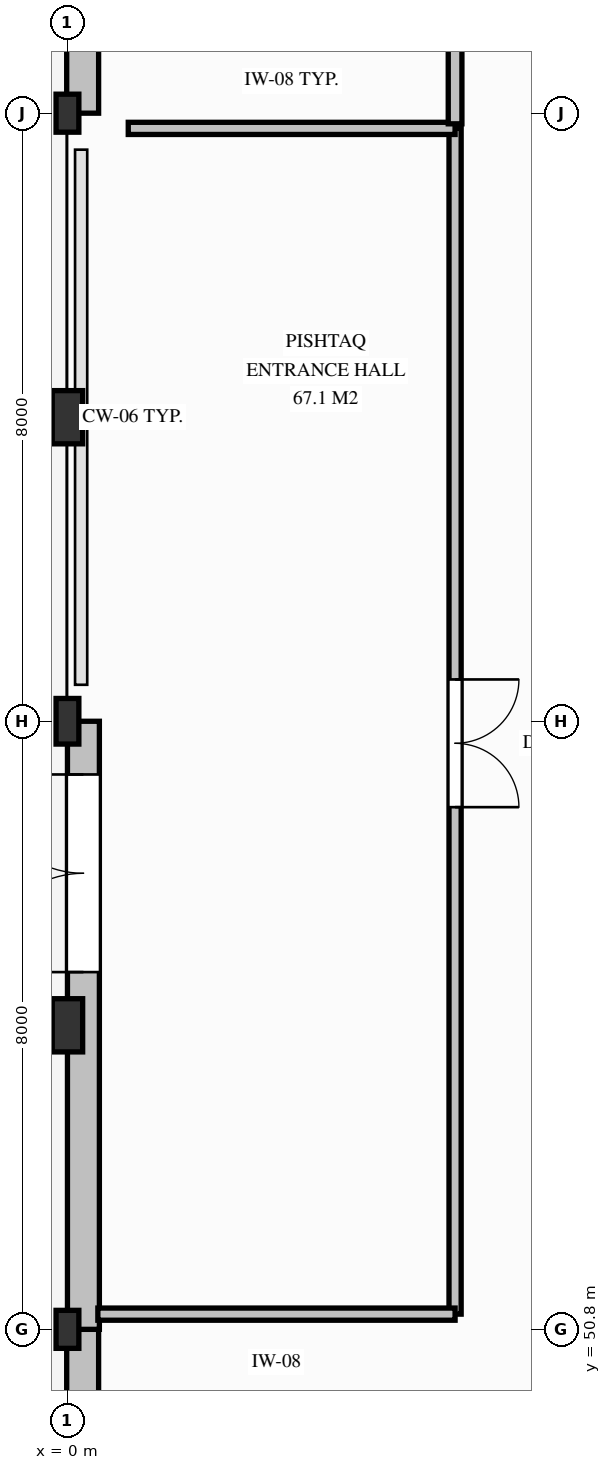
"""IFC4 building model, lengths in metres.
Left out: names, types, materials, properties, quantities, classifications, styles, units other than length and angle.
Written with IfcOpenShell. Run it as: python <this file> out.ifc"""

import sys

from ifc_helpers import new_model, si_unit, direction, frame, frame_2d, origin, origin_2d, place, context, subcontext, project, spatial, rectangle, i_section, extrude, element, fill, save


model = new_model("IFC4")
c1 = context("Model", 3, precision=1e-05, world=origin(), true_north=direction((0.0, 1.0)))
c2 = subcontext(c1, "Body", "Model", "MODEL_VIEW")
j1 = project(units=[si_unit("LENGTHUNIT", "METRE"), si_unit("PLANEANGLEUNIT", "RADIAN")], contexts=[c1])
p1 = place(None, origin())
s1 = spatial("IfcSite", under=j1, at=p1, CompositionType="ELEMENT")
p2 = place(p1, origin())
s2 = spatial("IfcBuilding", under=s1, at=p2, CompositionType="ELEMENT")
p3 = place(p2, origin())
s3 = spatial("IfcBuildingStorey", under=s2, at=p3, CompositionType="ELEMENT", Elevation=0.0)
p4 = place(p3, frame((0.0, 50.8, 0.0), z_axis=(0.0, 0.0, 1.0), x_axis=(1.0, 0.0, 0.0)))
e1 = element("IfcColumn", 1, at=p4, inside=s3, PredefinedType="COLUMN", context=c2, shape_type="SweptSolid", body=[
    extrude(i_section(OverallWidth=0.3, OverallDepth=0.5, WebThickness=0.014, FlangeThickness=0.028, FilletRadius=0.027, at=origin_2d()), origin(), (0.0, 0.0, 1.0), 4.5),
])
p5 = place(p3, frame((0.0, 58.8, 0.0), z_axis=(0.0, 0.0, 1.0), x_axis=(1.0, 0.0, 0.0)))
e2 = element("IfcColumn", 2, at=p5, inside=s3, PredefinedType="COLUMN", context=c2, shape_type="SweptSolid", body=[
    extrude(i_section(OverallWidth=0.3, OverallDepth=0.6, WebThickness=0.015, FlangeThickness=0.03, FilletRadius=0.027, at=origin_2d()), origin(), (0.0, 0.0, 1.0), 4.5),
])
p6 = place(p3, frame((0.0, 66.8, 0.0), z_axis=(0.0, 0.0, 1.0), x_axis=(1.0, 0.0, 0.0)))
e3 = element("IfcColumn", 3, at=p6, inside=s3, PredefinedType="COLUMN", context=c2, shape_type="SweptSolid", body=[
    extrude(i_section(OverallWidth=0.3, OverallDepth=0.5, WebThickness=0.014, FlangeThickness=0.028, FilletRadius=0.027, at=origin_2d()), origin(), (0.0, 0.0, 1.0), 4.5),
])
for number, where, z_axis, x_axis in (
    (4, (0.0, 54.8, 0.0), (0.0, 0.0, 1.0), (1.0, 0.0, 0.0)),
    (5, (0.0, 62.8, 0.0), (0.0, 0.0, 1.0), (1.0, 0.0, 0.0)),
):
    element("IfcColumn", number, at=place(p3, frame(where, z_axis=z_axis, x_axis=x_axis)), inside=s3, PredefinedType="PILASTER", context=c2, shape_type="SweptSolid", body=[
        extrude(rectangle(XDim=0.4, YDim=0.7, at=origin_2d()), origin(), (0.0, 0.0, 1.0), 4.5),
    ])
p7 = place(p3, frame((0.2, 42.8, 0.0), z_axis=(0.0, 0.0, 1.0), x_axis=(0.0, 1.0, 0.0)))
e6 = element("IfcWall", 6, at=p7, inside=s3, PredefinedType="SOLIDWALL", context=c2, shape_type="SweptSolid", body=[
    extrude(rectangle(XDim=8.0, YDim=0.42, at=frame_2d((4.0, 0.0))), origin(), (0.0, 0.0, 1.0), 3.078),
])
p8 = place(p7, frame((1.992, 0.0, 0.85)))
e7 = element("IfcOpeningElement", 7, at=p8, cuts=e6, PredefinedType="OPENING", context=c2, shape_type="SweptSolid", body=[
    extrude(rectangle(XDim=1.35, YDim=1.8, at=frame_2d((0.675, 0.9))), frame((0.0, 0.22, 0.0), z_axis=(0.0, -1.0, 0.0), x_axis=(1.0, 0.0, 0.0)), (0.0, 0.0, 1.0), 0.44),
])
p9 = place(p7, frame((4.883, 0.0, 0.85)))
e8 = element("IfcOpeningElement", 8, at=p9, cuts=e6, PredefinedType="OPENING", context=c2, shape_type="SweptSolid", body=[
    extrude(rectangle(XDim=0.9, YDim=1.8, at=frame_2d((0.45, 0.9))), frame((0.0, 0.22, 0.0), z_axis=(0.0, -1.0, 0.0), x_axis=(1.0, 0.0, 0.0)), (0.0, 0.0, 1.0), 0.44),
])
p10 = place(p3, frame((0.21, 50.8, 0.0), z_axis=(0.0, 0.0, 1.0), x_axis=(0.0, 1.0, 0.0)))
e9 = element("IfcWall", 9, at=p10, inside=s3, PredefinedType="SOLIDWALL", context=c2, shape_type="SweptSolid", body=[
    extrude(rectangle(XDim=8.0, YDim=0.42, at=frame_2d((4.0, 0.0))), origin(), (0.0, 0.0, 1.0), 3.078),
])
p11 = place(p10, frame((4.7, 0.0, 0.0)))
e10 = element("IfcOpeningElement", 10, at=p11, cuts=e9, PredefinedType="OPENING", context=c2, shape_type="SweptSolid", body=[
    extrude(rectangle(XDim=2.6, YDim=2.6, at=frame_2d((1.3, 1.3))), frame((0.0, 0.22, 0.0), z_axis=(0.0, -1.0, 0.0), x_axis=(1.0, 0.0, 0.0)), (0.0, 0.0, 1.0), 0.44),
])
p12 = place(p3, frame((0.2, 66.8, 0.0), z_axis=(0.0, 0.0, 1.0), x_axis=(0.0, 1.0, 0.0)))
e11 = element("IfcWall", 11, at=p12, inside=s3, PredefinedType="SOLIDWALL", context=c2, shape_type="SweptSolid", body=[
    extrude(rectangle(XDim=8.0, YDim=0.42, at=frame_2d((4.0, 0.0))), origin(), (0.0, 0.0, 1.0), 3.078),
])
p13 = place(p3, frame((5.1, 66.6, 0.0), z_axis=(0.0, 0.0, 1.0), x_axis=(0.0, -1.0, 0.0)))
e12 = element("IfcWall", 12, at=p13, inside=s3, PredefinedType="PARTITIONING", context=c2, shape_type="SweptSolid", body=[
    extrude(rectangle(XDim=15.6, YDim=0.16, at=frame_2d((7.8, 0.0))), origin(), (0.0, 0.0, 1.0), 3.728),
])
p14 = place(p13, frame((7.25, 0.0, 0.0)))
e13 = element("IfcOpeningElement", 13, at=p14, cuts=e12, PredefinedType="OPENING", context=c2, shape_type="SweptSolid", body=[
    extrude(rectangle(XDim=1.68, YDim=2.26, at=frame_2d((0.84, 1.13))), frame((0.0, 0.09, 0.0), z_axis=(0.0, -1.0, 0.0), x_axis=(1.0, 0.0, 0.0)), (0.0, 0.0, 1.0), 0.18),
])
p15 = place(p3, frame((0.8, 66.6, 0.0), z_axis=(0.0, 0.0, 1.0), x_axis=(1.0, 0.0, 0.0)))
e14 = element("IfcWall", 14, at=p15, inside=s3, PredefinedType="PARTITIONING", context=c2, shape_type="SweptSolid", body=[
    extrude(rectangle(XDim=4.3, YDim=0.16, at=frame_2d((2.15, 0.0))), origin(), (0.0, 0.0, 1.0), 3.978),
])
p16 = place(p3, frame((5.1, 51.0, 0.0), z_axis=(0.0, 0.0, 1.0), x_axis=(-1.0, 0.0, 0.0)))
e15 = element("IfcWall", 15, at=p16, inside=s3, PredefinedType="PARTITIONING", context=c2, shape_type="SweptSolid", body=[
    extrude(rectangle(XDim=4.7, YDim=0.16, at=frame_2d((2.35, 0.0))), origin(), (0.0, 0.0, 1.0), 3.828),
])
p17 = place(p3, frame((5.1, 66.66, 0.0), z_axis=(0.0, 0.0, 1.0), x_axis=(0.0, 1.0, 0.0)))
e16 = element("IfcWall", 16, at=p17, inside=s3, PredefinedType="PARTITIONING", context=c2, shape_type="SweptSolid", body=[
    extrude(rectangle(XDim=26.89, YDim=0.18, at=frame_2d((13.445, 0.0))), origin(), (0.0, 0.0, 1.0), 3.828),
])
p18 = place(p17, frame((13.265, 0.0, 0.0)))
e17 = element("IfcOpeningElement", 17, at=p18, cuts=e16, PredefinedType="OPENING", context=c2, shape_type="SweptSolid", body=[
    extrude(rectangle(XDim=1.02, YDim=2.15, at=frame_2d((0.51, 1.075))), frame((0.0, 0.1, 0.0), z_axis=(0.0, -1.0, 0.0), x_axis=(1.0, 0.0, 0.0)), (0.0, 0.0, 1.0), 0.2),
])
p19 = place(p11, origin())
e18 = element("IfcDoor", 18, at=p19, inside=s3, OperationType="DOUBLE_DOOR_SINGLE_SWING", PredefinedType="DOOR", context=c2, shape_type="SweptSolid", body=[
    extrude(rectangle(XDim=2.6, YDim=2.6, at=frame_2d((1.3, 1.3))), frame((0.0, 0.025, 0.0), z_axis=(0.0, -1.0, 0.0), x_axis=(1.0, 0.0, 0.0)), (0.0, 0.0, 1.0), 0.05),
])
fill(e10, e18)
p20 = place(p14, origin())
e19 = element("IfcDoor", 19, at=p20, inside=s3, OperationType="DOUBLE_DOOR_SINGLE_SWING", PredefinedType="DOOR", context=c2, shape_type="SweptSolid", body=[
    extrude(rectangle(XDim=1.68, YDim=2.26, at=frame_2d((0.84, 1.13))), frame((0.0, 0.025, 0.0), z_axis=(0.0, -1.0, 0.0), x_axis=(1.0, 0.0, 0.0)), (0.0, 0.0, 1.0), 0.05),
])
fill(e13, e19)
save(model, sys.argv[1])
